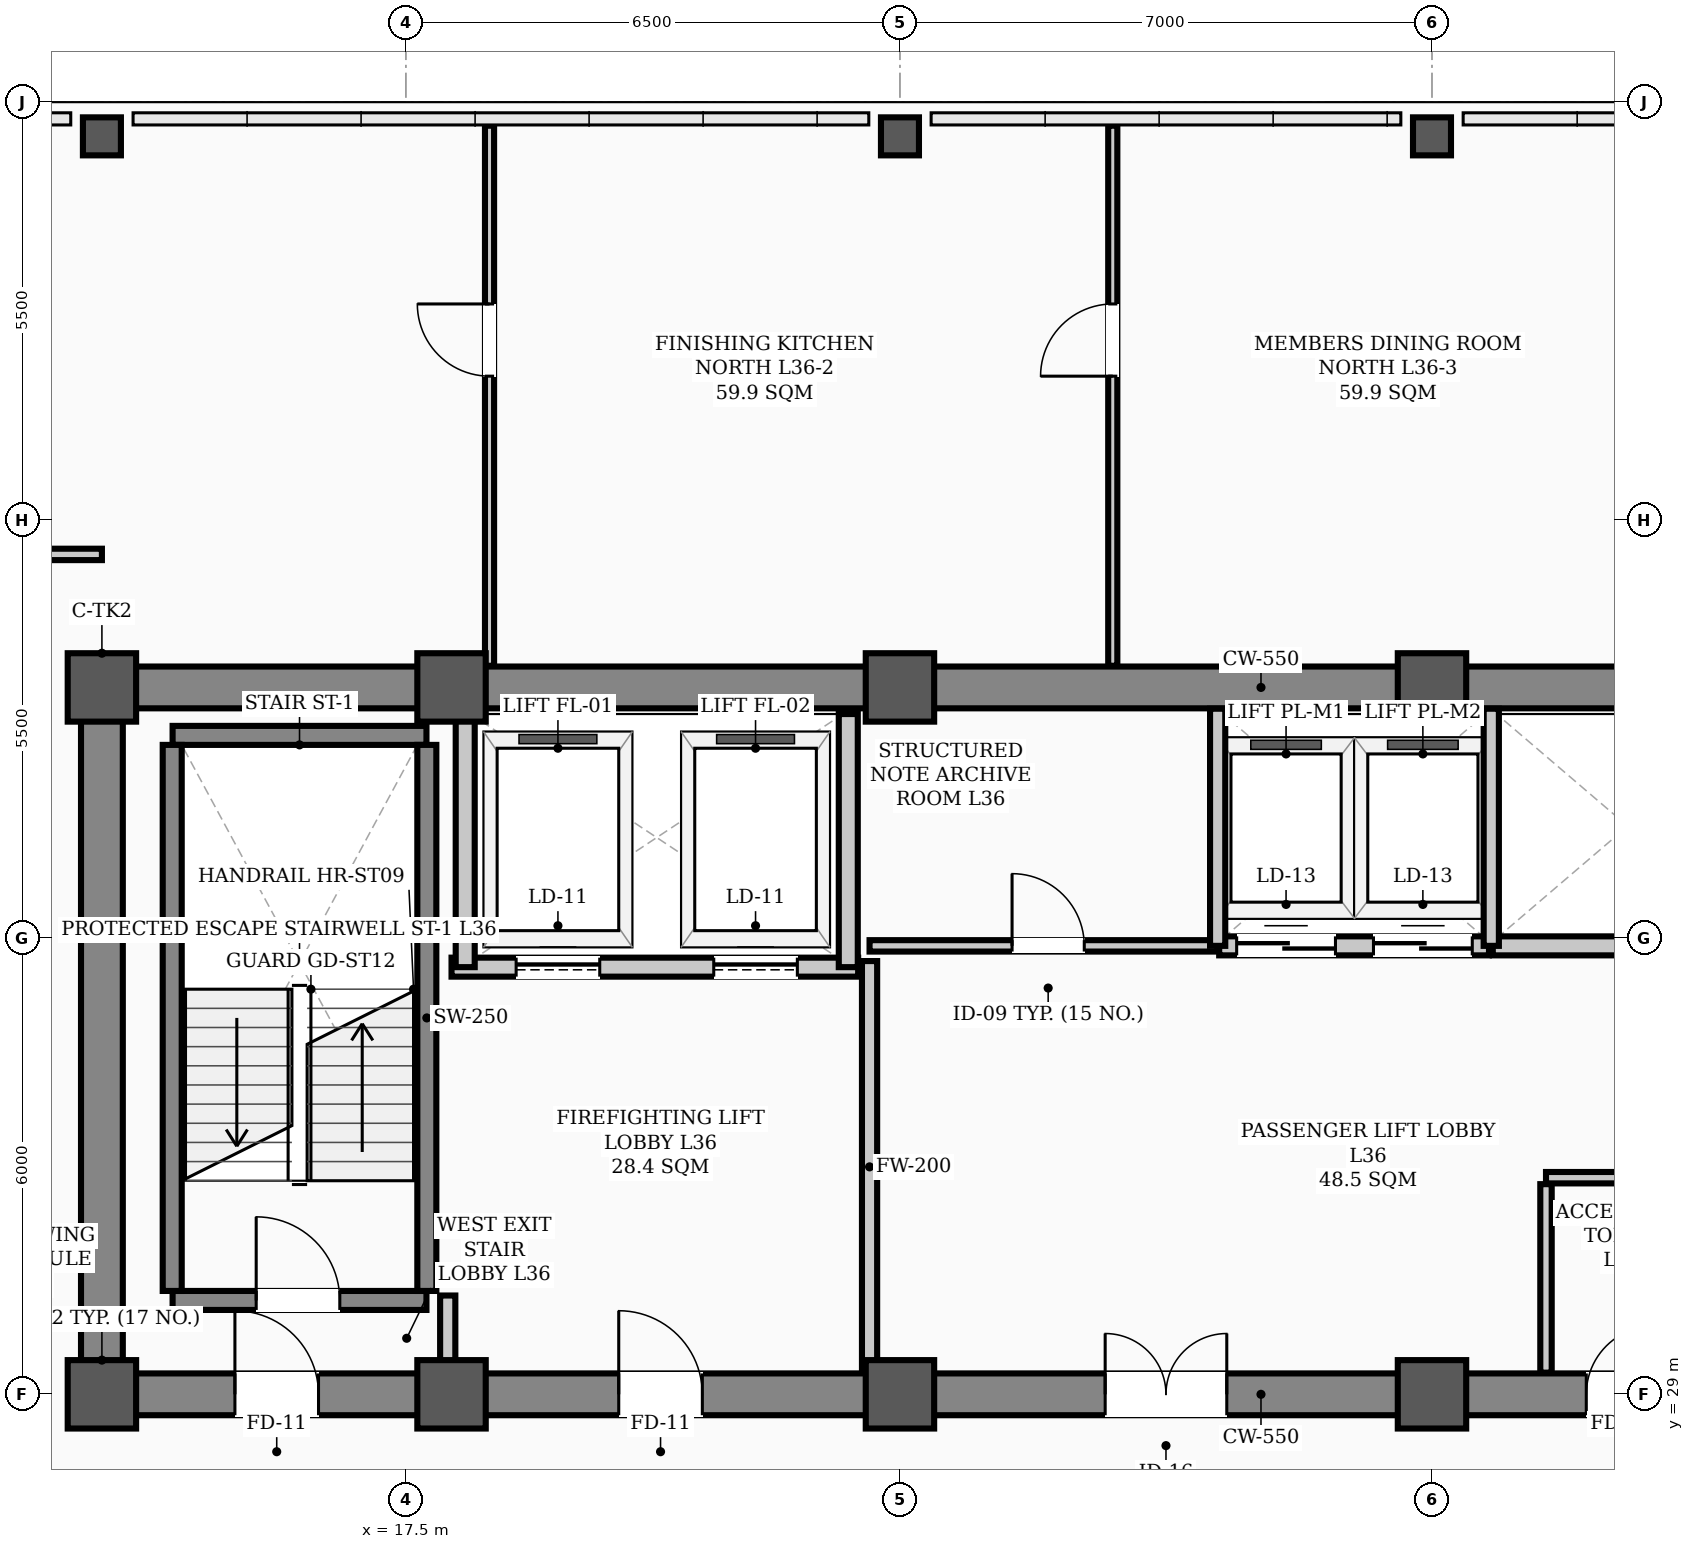
"""IFC4 building model, lengths in metres.
Left out: names, types, materials, properties, quantities, classifications, styles, units other than length and angle.
Written with IfcOpenShell. Run it as: python <this file> out.ifc"""

import sys

from ifc_helpers import new_model, si_unit, direction, frame, frame_2d, origin, origin_2d, place, context, subcontext, project, spatial, rectangle, hollow_rectangle, extrude, element, fill, save


model = new_model("IFC4")
c1 = context("Model", 3, precision=1e-05, world=origin(), true_north=direction((0.0, 1.0)))
c2 = subcontext(c1, "Body", "Model", "MODEL_VIEW")
j1 = project(units=[si_unit("LENGTHUNIT", "METRE"), si_unit("PLANEANGLEUNIT", "RADIAN")], contexts=[c1])
p1 = place(None, origin())
s1 = spatial("IfcSite", under=j1, at=p1, CompositionType="ELEMENT")
p2 = place(p1, origin())
s2 = spatial("IfcBuilding", under=s1, at=p2, CompositionType="ELEMENT")
p3 = place(p2, frame((0.0, 0.0, 146.1)))
s3 = spatial("IfcBuildingStorey", under=s2, at=p3, CompositionType="ELEMENT", Elevation=146.1)
for number, where, z_axis, x_axis in (
    (1, (13.5, 29.0, 0.0), (0.0, 0.0, 1.0), (1.0, 0.0, 0.0)),
    (2, (13.5, 38.3, 0.0), (0.0, 0.0, 1.0), (1.0, 0.0, 0.0)),
    (3, (18.1, 29.0, 0.0), (0.0, 0.0, 1.0), (1.0, 0.0, 0.0)),
    (4, (18.1, 38.3, 0.0), (0.0, 0.0, 1.0), (1.0, 0.0, 0.0)),
    (5, (24.0, 29.0, 0.0), (0.0, 0.0, 1.0), (1.0, 0.0, 0.0)),
    (6, (24.0, 38.3, 0.0), (0.0, 0.0, 1.0), (1.0, 0.0, 0.0)),
    (7, (31.0, 29.0, 0.0), (0.0, 0.0, 1.0), (1.0, 0.0, 0.0)),
    (8, (31.0, 38.3, 0.0), (0.0, 0.0, 1.0), (1.0, 0.0, 0.0)),
):
    element("IfcColumn", number, at=place(p3, frame(where, z_axis=z_axis, x_axis=x_axis)), inside=s3, PredefinedType="COLUMN", context=c2, shape_type="SweptSolid", body=[
        extrude(hollow_rectangle(XDim=0.9, YDim=0.9, WallThickness=0.035, InnerFilletRadius=0.017, OuterFilletRadius=0.052, at=origin_2d()), origin(), (0.0, 0.0, 1.0), 3.9),
    ])
for number, where, z_axis, x_axis in (
    (9, (13.5, 45.55, 0.0), (0.0, 0.0, 1.0), (1.0, 0.0, 0.0)),
    (10, (24.0, 45.55, 0.0), (0.0, 0.0, 1.0), (1.0, 0.0, 0.0)),
    (11, (31.0, 45.55, 0.0), (0.0, 0.0, 1.0), (1.0, 0.0, 0.0)),
):
    element("IfcColumn", number, at=place(p3, frame(where, z_axis=z_axis, x_axis=x_axis)), inside=s3, PredefinedType="COLUMN", context=c2, shape_type="SweptSolid", body=[
        extrude(hollow_rectangle(XDim=0.5, YDim=0.5, WallThickness=0.024, InnerFilletRadius=0.012, OuterFilletRadius=0.036, at=origin_2d()), origin(), (0.0, 0.0, 1.0), 3.9),
    ])
p4 = place(p3, frame((13.5, 29.0, 0.0), z_axis=(0.0, 0.0, 1.0), x_axis=(1.0, 0.0, 0.0)))
e12 = element("IfcWall", 12, at=p4, inside=s3, PredefinedType="SHEAR", context=c2, shape_type="SweptSolid", body=[
    extrude(rectangle(XDim=30.5, YDim=0.55, at=frame_2d((15.25, 0.0))), origin(), (0.0, 0.0, 1.0), 3.72),
])
p5 = place(p4, frame((1.75, 0.0, 0.0)))
e13 = element("IfcOpeningElement", 13, at=p5, cuts=e12, PredefinedType="OPENING", context=c2, shape_type="SweptSolid", body=[
    extrude(rectangle(XDim=1.1, YDim=2.08, at=frame_2d((0.55, 1.04))), frame((0.0, 0.285, 0.0), z_axis=(0.0, -1.0, 0.0), x_axis=(1.0, 0.0, 0.0)), (0.0, 0.0, 1.0), 0.57),
])
p6 = place(p4, frame((26.7, 0.0, 0.0)))
e14 = element("IfcOpeningElement", 14, at=p6, cuts=e12, PredefinedType="OPENING", context=c2, shape_type="SweptSolid", body=[
    extrude(rectangle(XDim=1.1, YDim=2.08, at=frame_2d((0.55, 1.04))), frame((0.0, 0.285, 0.0), z_axis=(0.0, -1.0, 0.0), x_axis=(1.0, 0.0, 0.0)), (0.0, 0.0, 1.0), 0.57),
])
p7 = place(p4, frame((6.8, 0.0, 0.0)))
e15 = element("IfcOpeningElement", 15, at=p7, cuts=e12, PredefinedType="OPENING", context=c2, shape_type="SweptSolid", body=[
    extrude(rectangle(XDim=1.1, YDim=2.08, at=frame_2d((0.55, 1.04))), frame((0.0, 0.285, 0.0), z_axis=(0.0, -1.0, 0.0), x_axis=(1.0, 0.0, 0.0)), (0.0, 0.0, 1.0), 0.57),
])
p8 = place(p4, frame((13.2, 0.0, 0.0)))
e16 = element("IfcOpeningElement", 16, at=p8, cuts=e12, PredefinedType="OPENING", context=c2, shape_type="SweptSolid", body=[
    extrude(rectangle(XDim=1.6, YDim=2.08, at=frame_2d((0.8, 1.04))), frame((0.0, 0.285, 0.0), z_axis=(0.0, -1.0, 0.0), x_axis=(1.0, 0.0, 0.0)), (0.0, 0.0, 1.0), 0.57),
])
p9 = place(p4, frame((19.53, 0.0, 0.0)))
e17 = element("IfcOpeningElement", 17, at=p9, cuts=e12, PredefinedType="OPENING", context=c2, shape_type="SweptSolid", body=[
    extrude(rectangle(XDim=0.9, YDim=2.08, at=frame_2d((0.45, 1.04))), frame((0.0, 0.285, 0.0), z_axis=(0.0, -1.0, 0.0), x_axis=(1.0, 0.0, 0.0)), (0.0, 0.0, 1.0), 0.57),
])
p10 = place(p4, frame((21.57, 0.0, 0.0)))
e18 = element("IfcOpeningElement", 18, at=p10, cuts=e12, PredefinedType="OPENING", context=c2, shape_type="SweptSolid", body=[
    extrude(rectangle(XDim=0.9, YDim=2.08, at=frame_2d((0.45, 1.04))), frame((0.0, 0.285, 0.0), z_axis=(0.0, -1.0, 0.0), x_axis=(1.0, 0.0, 0.0)), (0.0, 0.0, 1.0), 0.57),
])
p11 = place(p3, frame((13.5, 38.3, 0.0), z_axis=(0.0, 0.0, 1.0), x_axis=(1.0, 0.0, 0.0)))
e19 = element("IfcWall", 19, at=p11, inside=s3, PredefinedType="SHEAR", context=c2, shape_type="SweptSolid", body=[
    extrude(rectangle(XDim=30.5, YDim=0.55, at=frame_2d((15.25, 0.0))), origin(), (0.0, 0.0, 1.0), 3.72),
])
p12 = place(p3, frame((13.5, 29.35, 0.0), z_axis=(0.0, 0.0, 1.0), x_axis=(0.0, 1.0, 0.0)))
e20 = element("IfcWall", 20, at=p12, inside=s3, PredefinedType="SHEAR", context=c2, shape_type="SweptSolid", body=[
    extrude(rectangle(XDim=8.6, YDim=0.55, at=frame_2d((4.3, 0.0))), origin(), (0.0, 0.0, 1.0), 3.72),
])
p13 = place(p3, frame((14.43, 30.235, 0.0), z_axis=(0.0, 0.0, 1.0), x_axis=(1.0, 0.0, 0.0)))
e21 = element("IfcWall", 21, at=p13, inside=s3, PredefinedType="STANDARD", context=c2, shape_type="SweptSolid", body=[
    extrude(rectangle(XDim=3.34, YDim=0.25, at=frame_2d((1.67, 0.0))), origin(), (0.0, 0.0, 1.0), 3.72),
])
p14 = place(p13, frame((1.1, 0.0, 0.0)))
e22 = element("IfcOpeningElement", 22, at=p14, cuts=e21, PredefinedType="OPENING", context=c2, shape_type="SweptSolid", body=[
    extrude(rectangle(XDim=1.1, YDim=2.08, at=frame_2d((0.55, 1.04))), frame((0.0, 0.135, 0.0), z_axis=(0.0, -1.0, 0.0), x_axis=(1.0, 0.0, 0.0)), (0.0, 0.0, 1.0), 0.27),
])
p15 = place(p3, frame((14.43, 37.669, 0.0), z_axis=(0.0, 0.0, 1.0), x_axis=(1.0, 0.0, 0.0)))
e23 = element("IfcWall", 23, at=p15, inside=s3, PredefinedType="STANDARD", context=c2, shape_type="SweptSolid", body=[
    extrude(rectangle(XDim=3.34, YDim=0.25, at=frame_2d((1.67, 0.0))), origin(), (0.0, 0.0, 1.0), 3.72),
])
for number, where, z_axis, x_axis in (
    (24, (14.425, 30.36, 0.0), (0.0, 0.0, 1.0), (0.0, 1.0, 0.0)),
    (25, (17.775, 30.36, 0.0), (0.0, 0.0, 1.0), (0.0, 1.0, 0.0)),
):
    element("IfcWall", number, at=place(p3, frame(where, z_axis=z_axis, x_axis=x_axis)), inside=s3, PredefinedType="STANDARD", context=c2, shape_type="SweptSolid", body=[
        extrude(rectangle(XDim=7.184, YDim=0.25, at=frame_2d((3.592, 0.0))), origin(), (0.0, 0.0, 1.0), 3.72),
    ])
p16 = place(p3, frame((18.1, 34.62, 0.0), z_axis=(0.0, 0.0, 1.0), x_axis=(1.0, 0.0, 0.0)))
e26 = element("IfcWall", 26, at=p16, inside=s3, PredefinedType="STANDARD", context=c2, shape_type="SweptSolid", body=[
    extrude(rectangle(XDim=5.35, YDim=0.25, at=frame_2d((2.675, 0.0))), origin(), (0.0, 0.0, 1.0), 3.72),
])
p17 = place(p16, frame((0.85, 0.0, 0.0)))
e27 = element("IfcOpeningElement", 27, at=p17, cuts=e26, PredefinedType="OPENING", context=c2, shape_type="SweptSolid", body=[
    extrude(rectangle(XDim=1.1, YDim=2.08, at=frame_2d((0.55, 1.04))), frame((0.0, 0.135, 0.0), z_axis=(0.0, -1.0, 0.0), x_axis=(1.0, 0.0, 0.0)), (0.0, 0.0, 1.0), 0.27),
])
p18 = place(p16, frame((3.45, 0.0, 0.0)))
e28 = element("IfcOpeningElement", 28, at=p18, cuts=e26, PredefinedType="OPENING", context=c2, shape_type="SweptSolid", body=[
    extrude(rectangle(XDim=1.1, YDim=2.08, at=frame_2d((0.55, 1.04))), frame((0.0, 0.135, 0.0), z_axis=(0.0, -1.0, 0.0), x_axis=(1.0, 0.0, 0.0)), (0.0, 0.0, 1.0), 0.27),
])
for number, where, z_axis, x_axis in (
    (29, (18.28, 34.62, 0.0), (0.0, 0.0, 1.0), (0.0, 1.0, 0.0)),
    (30, (23.32, 34.62, 0.0), (0.0, 0.0, 1.0), (0.0, 1.0, 0.0)),
):
    element("IfcWall", number, at=place(p3, frame(where, z_axis=z_axis, x_axis=x_axis)), inside=s3, PredefinedType="STANDARD", context=c2, shape_type="SweptSolid", body=[
        extrude(rectangle(XDim=3.33, YDim=0.25, at=frame_2d((1.665, 0.0))), origin(), (0.0, 0.0, 1.0), 3.35),
    ])
p19 = place(p3, frame((28.2, 34.9, 0.0), z_axis=(0.0, 0.0, 1.0), x_axis=(1.0, 0.0, 0.0)))
e31 = element("IfcWall", 31, at=p19, inside=s3, PredefinedType="STANDARD", context=c2, shape_type="SweptSolid", body=[
    extrude(rectangle(XDim=3.55, YDim=0.25, at=frame_2d((1.775, 0.0))), origin(), (0.0, 0.0, 1.0), 3.72),
])
p20 = place(p19, frame((0.23, 0.0, 0.0)))
e32 = element("IfcOpeningElement", 32, at=p20, cuts=e31, PredefinedType="OPENING", context=c2, shape_type="SweptSolid", body=[
    extrude(rectangle(XDim=1.3, YDim=2.08, at=frame_2d((0.65, 1.04))), frame((0.0, 0.135, 0.0), z_axis=(0.0, -1.0, 0.0), x_axis=(1.0, 0.0, 0.0)), (0.0, 0.0, 1.0), 0.27),
])
p21 = place(p19, frame((2.03, 0.0, 0.0)))
e33 = element("IfcOpeningElement", 33, at=p21, cuts=e31, PredefinedType="OPENING", context=c2, shape_type="SweptSolid", body=[
    extrude(rectangle(XDim=1.3, YDim=2.08, at=frame_2d((0.65, 1.04))), frame((0.0, 0.135, 0.0), z_axis=(0.0, -1.0, 0.0), x_axis=(1.0, 0.0, 0.0)), (0.0, 0.0, 1.0), 0.27),
])
p22 = place(p3, frame((31.8, 34.9, 0.0), z_axis=(0.0, 0.0, 1.0), x_axis=(1.0, 0.0, 0.0)))
e34 = element("IfcWall", 34, at=p22, inside=s3, PredefinedType="STANDARD", context=c2, shape_type="SweptSolid", body=[
    extrude(rectangle(XDim=3.6, YDim=0.25, at=frame_2d((1.8, 0.0))), origin(), (0.0, 0.0, 1.0), 3.72),
])
p23 = place(p3, frame((23.6, 34.9, 0.0), z_axis=(0.0, 0.0, 1.0), x_axis=(1.0, 0.0, 0.0)))
e35 = element("IfcWall", 35, at=p23, inside=s3, PredefinedType="PARTITIONING", context=c2, shape_type="SweptSolid", body=[
    extrude(rectangle(XDim=4.58, YDim=0.15, at=frame_2d((2.29, 0.0))), origin(), (0.0, 0.0, 1.0), 3.72),
])
p24 = place(p23, frame((1.875, 0.0, 0.0)))
e36 = element("IfcOpeningElement", 36, at=p24, cuts=e35, PredefinedType="OPENING", context=c2, shape_type="SweptSolid", body=[
    extrude(rectangle(XDim=0.95, YDim=2.08, at=frame_2d((0.475, 1.04))), frame((0.0, 0.085, 0.0), z_axis=(0.0, -1.0, 0.0), x_axis=(1.0, 0.0, 0.0)), (0.0, 0.0, 1.0), 0.17),
])
p25 = place(p3, frame((32.5, 31.85, 0.0), z_axis=(0.0, 0.0, 1.0), x_axis=(1.0, 0.0, 0.0)))
e37 = element("IfcWall", 37, at=p25, inside=s3, PredefinedType="PARTITIONING", context=c2, shape_type="SweptSolid", body=[
    extrude(rectangle(XDim=4.1, YDim=0.15, at=frame_2d((2.05, 0.0))), origin(), (0.0, 0.0, 1.0), 3.72),
])
p26 = place(p3, frame((2.31, 40.05, 0.0), z_axis=(0.0, 0.0, 1.0), x_axis=(1.0, 0.0, 0.0)))
e38 = element("IfcWall", 38, at=p26, inside=s3, PredefinedType="PARTITIONING", context=c2, shape_type="SweptSolid", body=[
    extrude(rectangle(XDim=11.19, YDim=0.15, at=frame_2d((5.595, 0.0))), origin(), (0.0, 0.0, 1.0), 3.2),
])
p27 = place(p26, frame((9.165, 0.0, 0.0)))
e39 = element("IfcOpeningElement", 39, at=p27, cuts=e38, PredefinedType="OPENING", context=c2, shape_type="SweptSolid", body=[
    extrude(rectangle(XDim=0.95, YDim=2.08, at=frame_2d((0.475, 1.04))), frame((0.0, 0.085, 0.0), z_axis=(0.0, -1.0, 0.0), x_axis=(1.0, 0.0, 0.0)), (0.0, 0.0, 1.0), 0.17),
])
p28 = place(p3, frame((18.05, 29.285, 0.0), z_axis=(0.0, 0.0, 1.0), x_axis=(0.0, 1.0, 0.0)))
e40 = element("IfcWall", 40, at=p28, inside=s3, PredefinedType="STANDARD", context=c2, shape_type="SweptSolid", body=[
    extrude(rectangle(XDim=1.015, YDim=0.2, at=frame_2d((0.508, 0.0))), origin(), (0.0, 0.0, 1.0), 3.35),
])
p29 = place(p3, frame((23.6, 29.285, 0.0), z_axis=(0.0, 0.0, 1.0), x_axis=(0.0, 1.0, 0.0)))
e41 = element("IfcWall", 41, at=p29, inside=s3, PredefinedType="STANDARD", context=c2, shape_type="SweptSolid", body=[
    extrude(rectangle(XDim=5.415, YDim=0.2, at=frame_2d((2.708, 0.0))), origin(), (0.0, 0.0, 1.0), 3.2),
])
p30 = place(p3, frame((32.5, 29.285, 0.0), z_axis=(0.0, 0.0, 1.0), x_axis=(0.0, 1.0, 0.0)))
e42 = element("IfcWall", 42, at=p30, inside=s3, PredefinedType="PARTITIONING", context=c2, shape_type="SweptSolid", body=[
    extrude(rectangle(XDim=2.48, YDim=0.15, at=frame_2d((1.24, 0.0))), origin(), (0.0, 0.0, 1.0), 3.35),
])
p31 = place(p3, frame((18.6, 38.585, 0.0), z_axis=(0.0, 0.0, 1.0), x_axis=(0.0, 1.0, 0.0)))
e43 = element("IfcWall", 43, at=p31, inside=s3, PredefinedType="PARTITIONING", context=c2, shape_type="SweptSolid", body=[
    extrude(rectangle(XDim=7.105, YDim=0.12, at=frame_2d((3.552, 0.0))), origin(), (0.0, 0.0, 1.0), 3.212),
])
p32 = place(p31, frame((3.81, 0.0, 0.0)))
e44 = element("IfcOpeningElement", 44, at=p32, cuts=e43, PredefinedType="OPENING", context=c2, shape_type="SweptSolid", body=[
    extrude(rectangle(XDim=0.95, YDim=2.08, at=frame_2d((0.475, 1.04))), frame((0.0, 0.07, 0.0), z_axis=(0.0, -1.0, 0.0), x_axis=(1.0, 0.0, 0.0)), (0.0, 0.0, 1.0), 0.14),
])
p33 = place(p3, frame((26.8, 38.585, 0.0), z_axis=(0.0, 0.0, 1.0), x_axis=(0.0, 1.0, 0.0)))
e45 = element("IfcWall", 45, at=p33, inside=s3, PredefinedType="PARTITIONING", context=c2, shape_type="SweptSolid", body=[
    extrude(rectangle(XDim=7.105, YDim=0.12, at=frame_2d((3.552, 0.0))), origin(), (0.0, 0.0, 1.0), 3.212),
])
p34 = place(p33, frame((3.81, 0.0, 0.0)))
e46 = element("IfcOpeningElement", 46, at=p34, cuts=e45, PredefinedType="OPENING", context=c2, shape_type="SweptSolid", body=[
    extrude(rectangle(XDim=0.95, YDim=2.08, at=frame_2d((0.475, 1.04))), frame((0.0, 0.07, 0.0), z_axis=(0.0, -1.0, 0.0), x_axis=(1.0, 0.0, 0.0)), (0.0, 0.0, 1.0), 0.14),
])
for number, where, z_axis, x_axis in (
    (47, (28.18, 34.9, 0.0), (0.0, 0.0, 1.0), (0.0, 1.0, 0.0)),
    (48, (31.78, 34.9, 0.0), (0.0, 0.0, 1.0), (0.0, 1.0, 0.0)),
):
    element("IfcWall", number, at=place(p3, frame(where, z_axis=z_axis, x_axis=x_axis)), inside=s3, PredefinedType="STANDARD", context=c2, shape_type="SweptSolid", body=[
        extrude(rectangle(XDim=3.12, YDim=0.2, at=frame_2d((1.56, 0.0))), origin(), (0.0, 0.0, 1.0), 3.35),
    ])
p35 = place(p14, origin())
e49 = element("IfcDoor", 49, at=p35, inside=s3, OperationType="SINGLE_SWING_LEFT", PredefinedType="DOOR", context=c2, shape_type="SweptSolid", body=[
    extrude(rectangle(XDim=1.1, YDim=2.08, at=frame_2d((0.55, 1.04))), frame((0.0, 0.025, 0.0), z_axis=(0.0, -1.0, 0.0), x_axis=(1.0, 0.0, 0.0)), (0.0, 0.0, 1.0), 0.05),
])
fill(e22, e49)
p36 = place(p5, origin())
e50 = element("IfcDoor", 50, at=p36, inside=s3, OperationType="SINGLE_SWING_LEFT", PredefinedType="DOOR", context=c2, shape_type="SweptSolid", body=[
    extrude(rectangle(XDim=1.1, YDim=2.08, at=frame_2d((0.55, 1.04))), frame((0.0, 0.025, 0.0), z_axis=(0.0, -1.0, 0.0), x_axis=(1.0, 0.0, 0.0)), (0.0, 0.0, 1.0), 0.05),
])
fill(e13, e50)
p37 = place(p7, origin())
e51 = element("IfcDoor", 51, at=p37, inside=s3, OperationType="SINGLE_SWING_LEFT", PredefinedType="DOOR", context=c2, shape_type="SweptSolid", body=[
    extrude(rectangle(XDim=1.1, YDim=2.08, at=frame_2d((0.55, 1.04))), frame((0.0, 0.025, 0.0), z_axis=(0.0, -1.0, 0.0), x_axis=(1.0, 0.0, 0.0)), (0.0, 0.0, 1.0), 0.05),
])
fill(e15, e51)
p38 = place(p8, origin())
e52 = element("IfcDoor", 52, at=p38, inside=s3, OperationType="DOUBLE_DOOR_SINGLE_SWING", PredefinedType="DOOR", context=c2, shape_type="SweptSolid", body=[
    extrude(rectangle(XDim=1.6, YDim=2.08, at=frame_2d((0.8, 1.04))), frame((0.0, 0.025, 0.0), z_axis=(0.0, -1.0, 0.0), x_axis=(1.0, 0.0, 0.0)), (0.0, 0.0, 1.0), 0.05),
])
fill(e16, e52)
p39 = place(p24, origin())
e53 = element("IfcDoor", 53, at=p39, inside=s3, OperationType="SINGLE_SWING_LEFT", PredefinedType="DOOR", context=c2, shape_type="SweptSolid", body=[
    extrude(rectangle(XDim=0.95, YDim=2.08, at=frame_2d((0.475, 1.04))), frame((0.0, 0.025, 0.0), z_axis=(0.0, -1.0, 0.0), x_axis=(1.0, 0.0, 0.0)), (0.0, 0.0, 1.0), 0.05),
])
fill(e36, e53)
p40 = place(p9, origin())
e54 = element("IfcDoor", 54, at=p40, inside=s3, OperationType="SINGLE_SWING_RIGHT", PredefinedType="DOOR", context=c2, shape_type="SweptSolid", body=[
    extrude(rectangle(XDim=0.9, YDim=2.08, at=frame_2d((0.45, 1.04))), frame((0.0, 0.025, 0.0), z_axis=(0.0, -1.0, 0.0), x_axis=(1.0, 0.0, 0.0)), (0.0, 0.0, 1.0), 0.05),
])
fill(e17, e54)
p41 = place(p32, origin())
e55 = element("IfcDoor", 55, at=p41, inside=s3, OperationType="SINGLE_SWING_RIGHT", PredefinedType="DOOR", context=c2, shape_type="SweptSolid", body=[
    extrude(rectangle(XDim=0.95, YDim=2.08, at=frame_2d((0.475, 1.04))), frame((0.0, 0.025, 0.0), z_axis=(0.0, -1.0, 0.0), x_axis=(1.0, 0.0, 0.0)), (0.0, 0.0, 1.0), 0.05),
])
fill(e44, e55)
p42 = place(p34, origin())
e56 = element("IfcDoor", 56, at=p42, inside=s3, OperationType="SINGLE_SWING_LEFT", PredefinedType="DOOR", context=c2, shape_type="SweptSolid", body=[
    extrude(rectangle(XDim=0.95, YDim=2.08, at=frame_2d((0.475, 1.04))), frame((0.0, 0.025, 0.0), z_axis=(0.0, -1.0, 0.0), x_axis=(1.0, 0.0, 0.0)), (0.0, 0.0, 1.0), 0.05),
])
fill(e46, e56)
p43 = place(p17, origin())
e57 = element("IfcDoor", 57, at=p43, inside=s3, OperationType="SLIDING_TO_LEFT", PredefinedType="DOOR", context=c2, shape_type="SweptSolid", body=[
    extrude(rectangle(XDim=1.1, YDim=2.08, at=frame_2d((0.55, 1.04))), frame((0.0, 0.025, 0.0), z_axis=(0.0, -1.0, 0.0), x_axis=(1.0, 0.0, 0.0)), (0.0, 0.0, 1.0), 0.05),
])
fill(e27, e57)
p44 = place(p18, origin())
e58 = element("IfcDoor", 58, at=p44, inside=s3, OperationType="SLIDING_TO_LEFT", PredefinedType="DOOR", context=c2, shape_type="SweptSolid", body=[
    extrude(rectangle(XDim=1.1, YDim=2.08, at=frame_2d((0.55, 1.04))), frame((0.0, 0.025, 0.0), z_axis=(0.0, -1.0, 0.0), x_axis=(1.0, 0.0, 0.0)), (0.0, 0.0, 1.0), 0.05),
])
fill(e28, e58)
p45 = place(p20, origin())
e59 = element("IfcDoor", 59, at=p45, inside=s3, OperationType="DOUBLE_DOOR_SLIDING", PredefinedType="DOOR", context=c2, shape_type="SweptSolid", body=[
    extrude(rectangle(XDim=1.3, YDim=2.08, at=frame_2d((0.65, 1.04))), frame((0.0, 0.025, 0.0), z_axis=(0.0, -1.0, 0.0), x_axis=(1.0, 0.0, 0.0)), (0.0, 0.0, 1.0), 0.05),
])
fill(e32, e59)
p46 = place(p21, origin())
e60 = element("IfcDoor", 60, at=p46, inside=s3, OperationType="DOUBLE_DOOR_SLIDING", PredefinedType="DOOR", context=c2, shape_type="SweptSolid", body=[
    extrude(rectangle(XDim=1.3, YDim=2.08, at=frame_2d((0.65, 1.04))), frame((0.0, 0.025, 0.0), z_axis=(0.0, -1.0, 0.0), x_axis=(1.0, 0.0, 0.0)), (0.0, 0.0, 1.0), 0.05),
])
fill(e33, e60)
save(model, sys.argv[1])
